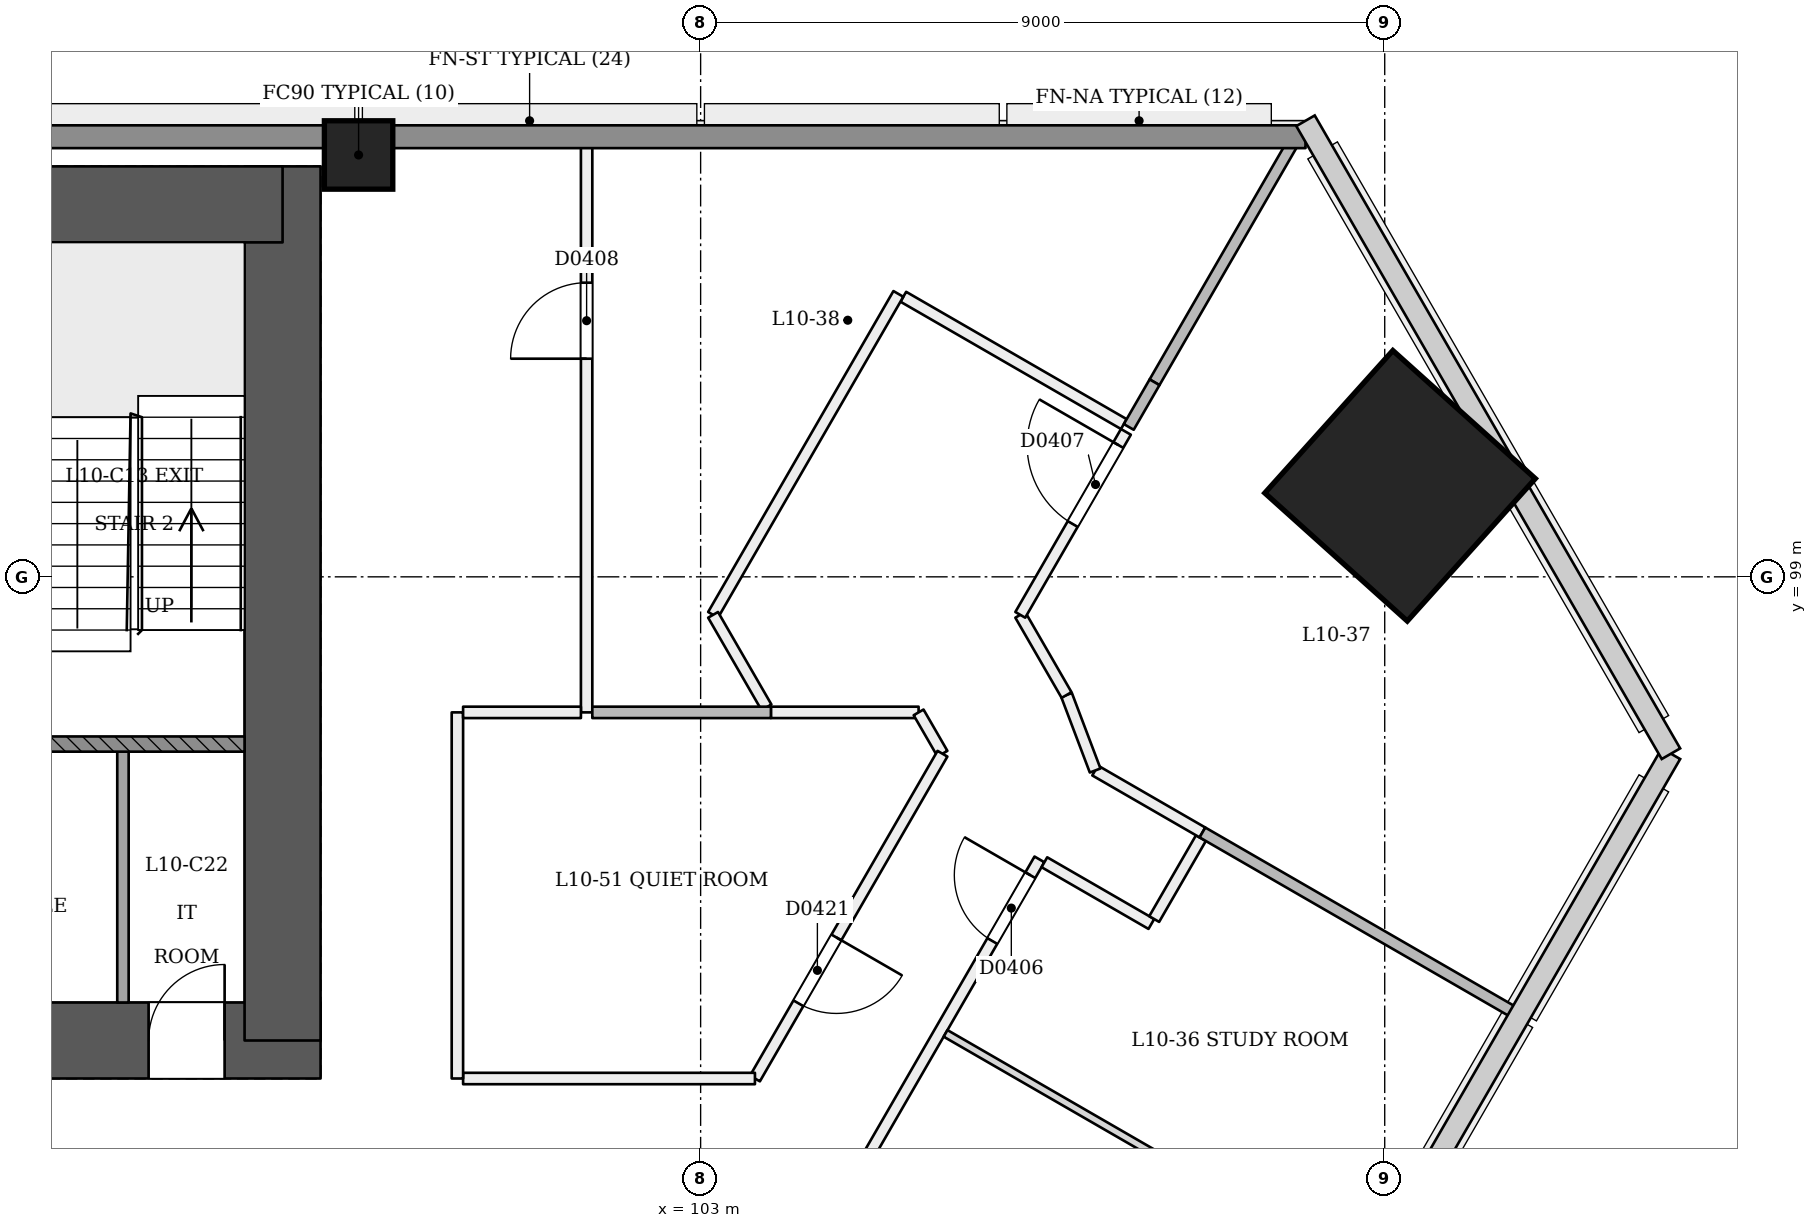
"""IFC4 building model, lengths in metres.
Left out: names, types, materials, properties, quantities, classifications, styles, units other than length and angle.
Written with IfcOpenShell. Run it as: python <this file> out.ifc"""

import sys

from ifc_helpers import new_model, si_unit, direction, frame, frame_2d, origin, origin_2d, place, context, subcontext, project, spatial, rectangle, extrude, element, fill, save


model = new_model("IFC4")
c1 = context("Model", 3, precision=1e-05, world=origin(), true_north=direction((0.0, 1.0)))
c2 = subcontext(c1, "Body", "Model", "MODEL_VIEW")
j1 = project(units=[si_unit("LENGTHUNIT", "METRE"), si_unit("PLANEANGLEUNIT", "RADIAN")], contexts=[c1])
p1 = place(None, origin())
s1 = spatial("IfcSite", under=j1, at=p1, CompositionType="ELEMENT")
p2 = place(p1, origin())
s2 = spatial("IfcBuilding", under=s1, at=p2, CompositionType="ELEMENT")
p3 = place(p2, frame((0.0, 0.0, 45.0)))
s3 = spatial("IfcBuildingStorey", under=s2, at=p3, CompositionType="ELEMENT", Elevation=45.0)
p4 = place(p3, frame((72.5, 92.9, 0.0), z_axis=(0.0, 0.0, 1.0), x_axis=(1.0, 0.0, 0.0)))
e1 = element("IfcWall", 1, at=p4, inside=s3, PredefinedType="SHEAR", context=c2, shape_type="SweptSolid", body=[
    extrude(rectangle(XDim=25.5, YDim=1.0, at=frame_2d((12.75, 0.0))), origin(), (0.0, 0.0, 1.0), 3.6),
])
p5 = place(p4, frame((1.3, 0.0, 0.0)))
e2 = element("IfcOpeningElement", 2, at=p5, cuts=e1, PredefinedType="OPENING", context=c2, shape_type="SweptSolid", body=[
    extrude(rectangle(XDim=1.2, YDim=2.1, at=frame_2d((0.6, 1.05))), frame((0.0, 0.51, 0.0), z_axis=(0.0, -1.0, 0.0), x_axis=(1.0, 0.0, 0.0)), (0.0, 0.0, 1.0), 1.021),
])
p6 = place(p4, frame((3.5, 0.0, 0.0)))
e3 = element("IfcOpeningElement", 3, at=p6, cuts=e1, PredefinedType="OPENING", context=c2, shape_type="SweptSolid", body=[
    extrude(rectangle(XDim=1.2, YDim=2.1, at=frame_2d((0.6, 1.05))), frame((0.0, 0.51, 0.0), z_axis=(0.0, -1.0, 0.0), x_axis=(1.0, 0.0, 0.0)), (0.0, 0.0, 1.0), 1.021),
])
p7 = place(p4, frame((13.5, 0.0, 0.0)))
e4 = element("IfcOpeningElement", 4, at=p7, cuts=e1, PredefinedType="OPENING", context=c2, shape_type="SweptSolid", body=[
    extrude(rectangle(XDim=1.2, YDim=2.1, at=frame_2d((0.6, 1.05))), frame((0.0, 0.51, 0.0), z_axis=(0.0, -1.0, 0.0), x_axis=(1.0, 0.0, 0.0)), (0.0, 0.0, 1.0), 1.021),
])
p8 = place(p4, frame((16.913, 0.0, 0.0)))
e5 = element("IfcOpeningElement", 5, at=p8, cuts=e1, PredefinedType="OPENING", context=c2, shape_type="SweptSolid", body=[
    extrude(rectangle(XDim=1.0, YDim=2.1, at=frame_2d((0.5, 1.05))), frame((0.0, 0.51, 0.0), z_axis=(0.0, -1.0, 0.0), x_axis=(1.0, 0.0, 0.0)), (0.0, 0.0, 1.0), 1.021),
])
p9 = place(p4, frame((20.8, 0.0, 0.0)))
e6 = element("IfcOpeningElement", 6, at=p9, cuts=e1, PredefinedType="OPENING", context=c2, shape_type="SweptSolid", body=[
    extrude(rectangle(XDim=1.0, YDim=2.1, at=frame_2d((0.5, 1.05))), frame((0.0, 0.51, 0.0), z_axis=(0.0, -1.0, 0.0), x_axis=(1.0, 0.0, 0.0)), (0.0, 0.0, 1.0), 1.021),
])
p10 = place(p4, frame((23.238, 0.0, 0.0)))
e7 = element("IfcOpeningElement", 7, at=p10, cuts=e1, PredefinedType="OPENING", context=c2, shape_type="SweptSolid", body=[
    extrude(rectangle(XDim=1.0, YDim=2.1, at=frame_2d((0.5, 1.05))), frame((0.0, 0.51, 0.0), z_axis=(0.0, -1.0, 0.0), x_axis=(1.0, 0.0, 0.0)), (0.0, 0.0, 1.0), 1.021),
])
p11 = place(p3, frame((97.5, 92.9, 0.0), z_axis=(0.0, 0.0, 1.0), x_axis=(0.0, 1.0, 0.0)))
e8 = element("IfcWall", 8, at=p11, inside=s3, PredefinedType="SHEAR", context=c2, shape_type="SweptSolid", body=[
    extrude(rectangle(XDim=11.5, YDim=1.0, at=frame_2d((5.75, 0.0))), origin(), (0.0, 0.0, 1.0), 3.6),
])
p12 = place(p3, frame((97.5, 103.9, 0.0), z_axis=(0.0, 0.0, 1.0), x_axis=(-1.0, 0.0, 0.0)))
e9 = element("IfcWall", 9, at=p12, inside=s3, PredefinedType="SHEAR", context=c2, shape_type="SweptSolid", body=[
    extrude(rectangle(XDim=25.5, YDim=1.0, at=frame_2d((12.75, 0.0))), origin(), (0.0, 0.0, 1.0), 3.6),
])
p13 = place(p3, frame((112.236, 100.187, 0.0), z_axis=(-0.028401814599, 0.009218727412, 0.999554076572), x_axis=(0.500757455385, -0.86530267379, 0.022209313539)))
e10 = element("IfcColumn", 10, at=p13, inside=s3, PredefinedType="COLUMN", context=c2, shape_type="SweptSolid", body=[
    extrude(rectangle(XDim=2.52, YDim=2.52, at=origin_2d()), origin(), (0.0, 0.0, 1.0), 3.602),
])
p14 = place(p3, frame((98.5, 104.55, 0.0), z_axis=(0.0, 0.0, 1.0), x_axis=(1.0, 0.0, 0.0)))
e11 = element("IfcColumn", 11, at=p14, inside=s3, PredefinedType="COLUMN", context=c2, shape_type="SweptSolid", body=[
    extrude(rectangle(XDim=0.9, YDim=0.9, at=origin_2d()), origin(), (0.0, 0.0, 1.0), 3.6),
])
p15 = place(p3, frame((89.157, 63.586, 0.0), z_axis=(0.0, 0.0, 1.0), x_axis=(0.500000960059, 0.866024849493, 0.0)))
e12 = element("IfcWall", 12, at=p15, inside=s3, PredefinedType="PARTITIONING", context=c2, shape_type="SweptSolid", body=[
    extrude(rectangle(XDim=36.6, YDim=0.15, at=frame_2d((18.3, 0.0))), origin(), (0.0, 0.0, 1.0), 2.7),
])
p16 = place(p15, frame((5.395, 0.0, 0.0)))
e13 = element("IfcOpeningElement", 13, at=p16, cuts=e12, PredefinedType="OPENING", context=c2, shape_type="SweptSolid", body=[
    extrude(rectangle(XDim=1.0, YDim=2.1, at=frame_2d((0.5, 1.05))), frame((0.0, 0.085, 0.0), z_axis=(0.0, -1.0, 0.0), x_axis=(1.0, 0.0, 0.0)), (0.0, 0.0, 1.0), 0.171),
])
p17 = place(p15, frame((7.605, 0.0, 0.0)))
e14 = element("IfcOpeningElement", 14, at=p17, cuts=e12, PredefinedType="OPENING", context=c2, shape_type="SweptSolid", body=[
    extrude(rectangle(XDim=1.0, YDim=2.1, at=frame_2d((0.5, 1.05))), frame((0.0, 0.085, 0.0), z_axis=(0.0, -1.0, 0.0), x_axis=(1.0, 0.0, 0.0)), (0.0, 0.0, 1.0), 0.171),
])
p18 = place(p15, frame((13.25, 0.0, 0.0)))
e15 = element("IfcOpeningElement", 15, at=p18, cuts=e12, PredefinedType="OPENING", context=c2, shape_type="SweptSolid", body=[
    extrude(rectangle(XDim=1.0, YDim=2.1, at=frame_2d((0.5, 1.05))), frame((0.0, 0.085, 0.0), z_axis=(0.0, -1.0, 0.0), x_axis=(1.0, 0.0, 0.0)), (0.0, 0.0, 1.0), 0.171),
])
p19 = place(p15, frame((16.605, 0.0, 0.0)))
e16 = element("IfcOpeningElement", 16, at=p19, cuts=e12, PredefinedType="OPENING", context=c2, shape_type="SweptSolid", body=[
    extrude(rectangle(XDim=1.0, YDim=2.1, at=frame_2d((0.5, 1.05))), frame((0.0, 0.085, 0.0), z_axis=(0.0, -1.0, 0.0), x_axis=(1.0, 0.0, 0.0)), (0.0, 0.0, 1.0), 0.171),
])
p20 = place(p15, frame((23.395, 0.0, 0.0)))
e17 = element("IfcOpeningElement", 17, at=p20, cuts=e12, PredefinedType="OPENING", context=c2, shape_type="SweptSolid", body=[
    extrude(rectangle(XDim=1.0, YDim=2.1, at=frame_2d((0.5, 1.05))), frame((0.0, 0.085, 0.0), z_axis=(0.0, -1.0, 0.0), x_axis=(1.0, 0.0, 0.0)), (0.0, 0.0, 1.0), 0.171),
])
p21 = place(p15, frame((27.8, 0.0, 0.0)))
e18 = element("IfcOpeningElement", 18, at=p21, cuts=e12, PredefinedType="OPENING", context=c2, shape_type="SweptSolid", body=[
    extrude(rectangle(XDim=1.2, YDim=2.1, at=frame_2d((0.6, 1.05))), frame((0.0, 0.085, 0.0), z_axis=(0.0, -1.0, 0.0), x_axis=(1.0, 0.0, 0.0)), (0.0, 0.0, 1.0), 0.171),
])
p22 = place(p15, frame((35.36, 0.0, 0.0)))
e19 = element("IfcOpeningElement", 19, at=p22, cuts=e12, PredefinedType="OPENING", context=c2, shape_type="SweptSolid", body=[
    extrude(rectangle(XDim=1.0, YDim=2.1, at=frame_2d((0.5, 1.05))), frame((0.0, 0.085, 0.0), z_axis=(0.0, -1.0, 0.0), x_axis=(1.0, 0.0, 0.0)), (0.0, 0.0, 1.0), 0.171),
])
p23 = place(p3, frame((107.522, 95.245, 0.0), z_axis=(0.0, 0.0, 1.0), x_axis=(0.866015446554, -0.500017246033, 0.0)))
e20 = element("IfcWall", 20, at=p23, inside=s3, PredefinedType="PARTITIONING", context=c2, shape_type="SweptSolid", body=[
    extrude(rectangle(XDim=1.625, YDim=0.15, at=frame_2d((0.812, 0.0))), origin(), (0.0, 0.0, 1.0), 3.1),
])
p24 = place(p3, frame((108.967, 94.498, 0.0), z_axis=(0.0, 0.0, 1.0), x_axis=(0.499963176624, 0.866046662726, 0.0)))
e21 = element("IfcWall", 21, at=p24, inside=s3, PredefinedType="PARTITIONING", context=c2, shape_type="SweptSolid", body=[
    extrude(rectangle(XDim=1.229, YDim=0.15, at=frame_2d((0.615, 0.0))), origin(), (0.0, 0.0, 1.0), 3.1),
])
p25 = place(p3, frame((109.602, 95.637, 0.0), z_axis=(0.0, 0.0, 1.0), x_axis=(-0.86604092097, 0.499973122483, 0.0)))
e22 = element("IfcWall", 22, at=p25, inside=s3, PredefinedType="PARTITIONING", context=c2, shape_type="SweptSolid", body=[
    extrude(rectangle(XDim=1.63, YDim=0.15, at=frame_2d((0.815, 0.0))), origin(), (0.0, 0.0, 1.0), 3.1),
])
p26 = place(p3, frame((108.19, 96.452, 0.0), z_axis=(0.0, 0.0, 1.0), x_axis=(-0.354044281385, 0.935228660178, 0.0)))
e23 = element("IfcWall", 23, at=p26, inside=s3, PredefinedType="PARTITIONING", context=c2, shape_type="SweptSolid", body=[
    extrude(rectangle(XDim=1.062, YDim=0.15, at=frame_2d((0.531, 0.0))), origin(), (0.0, 0.0, 1.0), 3.1),
])
p27 = place(p3, frame((107.814, 97.445, 0.0), z_axis=(0.0, 0.0, 1.0), x_axis=(-0.499976971178, 0.866038699073, 0.0)))
e24 = element("IfcWall", 24, at=p27, inside=s3, PredefinedType="PARTITIONING", context=c2, shape_type="SweptSolid", body=[
    extrude(rectangle(XDim=1.218, YDim=0.15, at=frame_2d((0.609, 0.0))), origin(), (0.0, 0.0, 1.0), 3.1),
])
p28 = place(p3, frame((107.205, 98.5, 0.0), z_axis=(0.0, 0.0, 1.0), x_axis=(0.499955621637, 0.866051024128, 0.0)))
e25 = element("IfcWall", 25, at=p28, inside=s3, PredefinedType="PARTITIONING", context=c2, shape_type="SweptSolid", body=[
    extrude(rectangle(XDim=2.78, YDim=0.15, at=frame_2d((1.39, 0.0))), origin(), (0.0, 0.0, 1.0), 3.1),
])
p29 = place(p28, frame((1.38, 0.0, 0.0)))
e26 = element("IfcOpeningElement", 26, at=p29, cuts=e25, PredefinedType="OPENING", context=c2, shape_type="SweptSolid", body=[
    extrude(rectangle(XDim=1.2, YDim=2.1, at=frame_2d((0.6, 1.05))), frame((0.0, 0.085, 0.0), z_axis=(0.0, -1.0, 0.0), x_axis=(1.0, 0.0, 0.0)), (0.0, 0.0, 1.0), 0.171),
])
p30 = place(p3, frame((101.5, 97.217, 0.0), z_axis=(0.0, 0.0, 1.0), x_axis=(0.0, 1.0, 0.0)))
e27 = element("IfcWall", 27, at=p30, inside=s3, PredefinedType="PARTITIONING", context=c2, shape_type="SweptSolid", body=[
    extrude(rectangle(XDim=7.683, YDim=0.15, at=frame_2d((3.842, 0.0))), origin(), (0.0, 0.0, 1.0), 2.6),
])
p31 = place(p30, frame((4.653, 0.0, 0.0)))
e28 = element("IfcOpeningElement", 28, at=p31, cuts=e27, PredefinedType="OPENING", context=c2, shape_type="SweptSolid", body=[
    extrude(rectangle(XDim=1.0, YDim=2.1, at=frame_2d((0.5, 1.05))), frame((0.0, 0.085, 0.0), z_axis=(0.0, -1.0, 0.0), x_axis=(1.0, 0.0, 0.0)), (0.0, 0.0, 1.0), 0.171),
])
p32 = place(p3, frame((108.568, 101.01, 0.0), z_axis=(0.0, 0.0, 1.0), x_axis=(-0.866014461049, 0.500018952895, 0.0)))
e29 = element("IfcWall", 29, at=p32, inside=s3, PredefinedType="PARTITIONING", context=c2, shape_type="SweptSolid", body=[
    extrude(rectangle(XDim=3.35, YDim=0.15, at=frame_2d((1.675, 0.0))), origin(), (0.0, 0.0, 1.0), 2.6),
])
p33 = place(p3, frame((105.602, 102.722, 0.0), z_axis=(0.0, 0.0, 1.0), x_axis=(-0.500011434042, -0.866018802236, 0.0)))
e30 = element("IfcWall", 30, at=p33, inside=s3, PredefinedType="PARTITIONING", context=c2, shape_type="SweptSolid", body=[
    extrude(rectangle(XDim=4.875, YDim=0.15, at=frame_2d((2.438, 0.0))), origin(), (0.0, 0.0, 1.0), 2.6),
])
p34 = place(p3, frame((103.164, 98.5, 0.0), z_axis=(0.0, 0.0, 1.0), x_axis=(0.499988131066, -0.866032256208, 0.0)))
e31 = element("IfcWall", 31, at=p34, inside=s3, PredefinedType="PARTITIONING", context=c2, shape_type="SweptSolid", body=[
    extrude(rectangle(XDim=1.405, YDim=0.15, at=frame_2d((0.703, 0.0))), origin(), (0.0, 0.0, 1.0), 3.1),
])
p35 = place(p3, frame((103.925, 97.217, 0.0), z_axis=(0.0, 0.0, 1.0), x_axis=(1.0, 0.0, 0.0)))
e32 = element("IfcWall", 32, at=p35, inside=s3, PredefinedType="PARTITIONING", context=c2, shape_type="SweptSolid", body=[
    extrude(rectangle(XDim=1.943, YDim=0.15, at=frame_2d((0.972, 0.0))), origin(), (0.0, 0.0, 1.0), 3.1),
])
p36 = place(p3, frame((105.868, 97.217, 0.0), z_axis=(0.0, 0.0, 1.0), x_axis=(0.500070269848, -0.865984829667, 0.0)))
e33 = element("IfcWall", 33, at=p36, inside=s3, PredefinedType="PARTITIONING", context=c2, shape_type="SweptSolid", body=[
    extrude(rectangle(XDim=0.628, YDim=0.15, at=frame_2d((0.314, 0.0))), origin(), (0.0, 0.0, 1.0), 3.1),
])
p37 = place(p3, frame((106.182, 96.673, 0.0), z_axis=(0.0, 0.0, 1.0), x_axis=(-0.499986575203, -0.866033154456, 0.0)))
e34 = element("IfcWall", 34, at=p37, inside=s3, PredefinedType="PARTITIONING", context=c2, shape_type="SweptSolid", body=[
    extrude(rectangle(XDim=4.934, YDim=0.15, at=frame_2d((2.467, 0.0))), origin(), (0.0, 0.0, 1.0), 3.1),
])
p38 = place(p37, frame((2.791, 0.0, 0.0)))
e35 = element("IfcOpeningElement", 35, at=p38, cuts=e34, PredefinedType="OPENING", context=c2, shape_type="SweptSolid", body=[
    extrude(rectangle(XDim=1.0, YDim=2.1, at=frame_2d((0.5, 1.05))), frame((0.0, 0.085, 0.0), z_axis=(0.0, -1.0, 0.0), x_axis=(1.0, 0.0, 0.0)), (0.0, 0.0, 1.0), 0.171),
])
p39 = place(p3, frame((103.715, 92.4, 0.0), z_axis=(0.0, 0.0, 1.0), x_axis=(-1.0, 0.0, 0.0)))
e36 = element("IfcWall", 36, at=p39, inside=s3, PredefinedType="PARTITIONING", context=c2, shape_type="SweptSolid", body=[
    extrude(rectangle(XDim=3.84, YDim=0.15, at=frame_2d((1.92, 0.0))), origin(), (0.0, 0.0, 1.0), 3.1),
])
p40 = place(p3, frame((99.8, 92.4, 0.0), z_axis=(0.0, 0.0, 1.0), x_axis=(0.0, 1.0, 0.0)))
e37 = element("IfcWall", 37, at=p40, inside=s3, PredefinedType="PARTITIONING", context=c2, shape_type="SweptSolid", body=[
    extrude(rectangle(XDim=4.817, YDim=0.15, at=frame_2d((2.408, 0.0))), origin(), (0.0, 0.0, 1.0), 3.1),
])
p41 = place(p3, frame((99.875, 97.217, 0.0), z_axis=(0.0, 0.0, 1.0), x_axis=(1.0, 0.0, 0.0)))
e38 = element("IfcWall", 38, at=p41, inside=s3, PredefinedType="PARTITIONING", context=c2, shape_type="SweptSolid", body=[
    extrude(rectangle(XDim=1.55, YDim=0.15, at=frame_2d((0.775, 0.0))), origin(), (0.0, 0.0, 1.0), 3.1),
])
p42 = place(p3, frame((111.718, 89.821, 0.0), z_axis=(0.0, 0.0, 1.0), x_axis=(-0.866025401434, 0.500000004071, 0.0)))
e39 = element("IfcWall", 39, at=p42, inside=s3, PredefinedType="PARTITIONING", context=c2, shape_type="SweptSolid", body=[
    extrude(rectangle(XDim=6.345, YDim=0.1, at=frame_2d((3.173, 0.0))), origin(), (0.0, 0.0, 1.0), 2.6),
])
p43 = place(p3, frame((113.707, 93.267, 0.0), z_axis=(0.0, 0.0, 1.0), x_axis=(-0.866028632512, 0.499994407638, 0.0)))
e40 = element("IfcWall", 40, at=p43, inside=s3, PredefinedType="PARTITIONING", context=c2, shape_type="SweptSolid", body=[
    extrude(rectangle(XDim=4.74, YDim=0.15, at=frame_2d((2.37, 0.0))), origin(), (0.0, 0.0, 1.0), 2.6),
])
p44 = place(p3, frame((110.9, 104.9, 0.0), z_axis=(0.0, 0.0, 1.0), x_axis=(-0.500012864272, -0.866017976466, 0.0)))
e41 = element("IfcWall", 41, at=p44, inside=s3, PredefinedType="PARTITIONING", context=c2, shape_type="SweptSolid", body=[
    extrude(rectangle(XDim=3.857, YDim=0.15, at=frame_2d((1.928, 0.0))), origin(), (0.0, 0.0, 1.0), 3.1),
])
p45 = place(p3, frame((108.972, 101.56, 0.0), z_axis=(0.0, 0.0, 1.0), x_axis=(-0.500085777205, -0.865975874628, 0.0)))
e42 = element("IfcWall", 42, at=p45, inside=s3, PredefinedType="PARTITIONING", context=c2, shape_type="SweptSolid", body=[
    extrude(rectangle(XDim=0.679, YDim=0.15, at=frame_2d((0.339, 0.0))), origin(), (0.0, 0.0, 1.0), 2.6),
])
p46 = place(p3, frame((101.575, 97.217, 0.0), z_axis=(0.0, 0.0, 1.0), x_axis=(1.0, 0.0, 0.0)))
e43 = element("IfcWall", 43, at=p46, inside=s3, PredefinedType="PARTITIONING", context=c2, shape_type="SweptSolid", body=[
    extrude(rectangle(XDim=2.35, YDim=0.15, at=frame_2d((1.175, 0.0))), origin(), (0.0, 0.0, 1.0), 3.1),
])
p47 = place(p3, frame((59.042, 104.79, 0.0), z_axis=(0.0, 0.0, 1.0), x_axis=(1.0, 0.0, 0.0)))
e44 = element("IfcWall", 44, at=p47, inside=s3, PredefinedType="SOLIDWALL", context=c2, shape_type="SweptSolid", body=[
    extrude(rectangle(XDim=51.916, YDim=0.3, at=frame_2d((25.958, 0.0))), origin(), (0.0, 0.0, 1.0), 2.6),
])
p48 = place(p3, frame((95.4, 93.4, 0.0), z_axis=(0.0, 0.0, 1.0), x_axis=(0.0, 1.0, 0.0)))
e45 = element("IfcWall", 45, at=p48, inside=s3, PredefinedType="PARTITIONING", context=c2, shape_type="SweptSolid", body=[
    extrude(rectangle(XDim=3.3, YDim=0.15, at=frame_2d((1.65, 0.0))), origin(), (0.0, 0.0, 1.0), 3.1),
])
p49 = place(p3, frame((94.1, 96.8, 0.0), z_axis=(0.0, 0.0, 1.0), x_axis=(1.0, 0.0, 0.0)))
e46 = element("IfcWall", 46, at=p49, inside=s3, PredefinedType="SOLIDWALL", context=c2, shape_type="SweptSolid", body=[
    extrude(rectangle(XDim=2.9, YDim=0.2, at=frame_2d((1.45, 0.0))), origin(), (0.0, 0.0, 1.0), 3.1),
])
p50 = place(p22, origin())
e47 = element("IfcDoor", 47, at=p50, inside=s3, OperationType="SINGLE_SWING_RIGHT", PredefinedType="NOTDEFINED", context=c2, shape_type="SweptSolid", body=[
    extrude(rectangle(XDim=1.0, YDim=2.1, at=frame_2d((0.5, 1.05))), frame((0.0, 0.025, 0.0), z_axis=(0.0, -1.0, 0.0), x_axis=(1.0, 0.0, 0.0)), (0.0, 0.0, 1.0), 0.05),
])
fill(e19, e47)
p51 = place(p29, origin())
e48 = element("IfcDoor", 48, at=p51, inside=s3, OperationType="SINGLE_SWING_RIGHT", PredefinedType="NOTDEFINED", context=c2, shape_type="SweptSolid", body=[
    extrude(rectangle(XDim=1.2, YDim=2.1, at=frame_2d((0.6, 1.05))), frame((0.0, 0.025, 0.0), z_axis=(0.0, -1.0, 0.0), x_axis=(1.0, 0.0, 0.0)), (0.0, 0.0, 1.0), 0.05),
])
fill(e26, e48)
p52 = place(p31, origin())
e49 = element("IfcDoor", 49, at=p52, inside=s3, OperationType="SINGLE_SWING_LEFT", PredefinedType="NOTDEFINED", context=c2, shape_type="SweptSolid", body=[
    extrude(rectangle(XDim=1.0, YDim=2.1, at=frame_2d((0.5, 1.05))), frame((0.0, 0.025, 0.0), z_axis=(0.0, -1.0, 0.0), x_axis=(1.0, 0.0, 0.0)), (0.0, 0.0, 1.0), 0.05),
])
fill(e28, e49)
p53 = place(p38, origin())
e50 = element("IfcDoor", 50, at=p53, inside=s3, OperationType="SINGLE_SWING_LEFT", PredefinedType="NOTDEFINED", context=c2, shape_type="SweptSolid", body=[
    extrude(rectangle(XDim=1.0, YDim=2.1, at=frame_2d((0.5, 1.05))), frame((0.0, 0.025, 0.0), z_axis=(0.0, -1.0, 0.0), x_axis=(1.0, 0.0, 0.0)), (0.0, 0.0, 1.0), 0.05),
])
fill(e35, e50)
p54 = place(p10, origin())
e51 = element("IfcDoor", 51, at=p54, inside=s3, OperationType="SINGLE_SWING_RIGHT", PredefinedType="NOTDEFINED", context=c2, shape_type="SweptSolid", body=[
    extrude(rectangle(XDim=1.0, YDim=2.1, at=frame_2d((0.5, 1.05))), frame((0.0, 0.025, 0.0), z_axis=(0.0, -1.0, 0.0), x_axis=(1.0, 0.0, 0.0)), (0.0, 0.0, 1.0), 0.05),
])
fill(e7, e51)
save(model, sys.argv[1])
